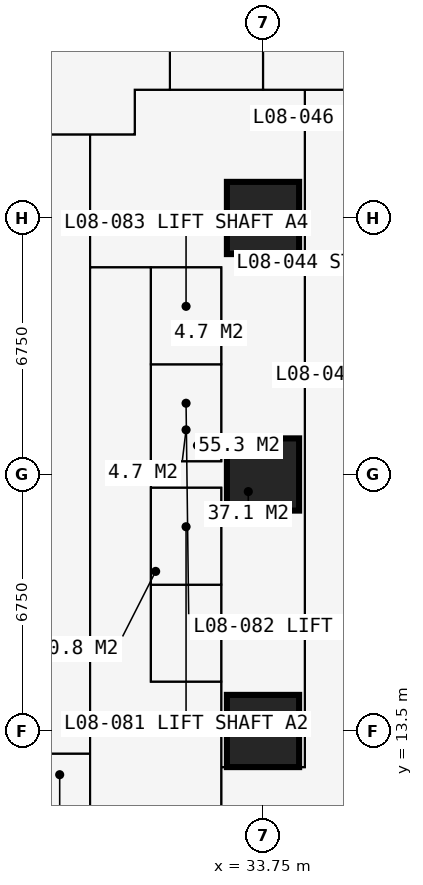
"""IFC4 building model, lengths in metres.
Left out: names, types, materials, properties, quantities, classifications, styles, units other than length and angle.
Written with IfcOpenShell. Run it as: python <this file> out.ifc"""

import sys

from ifc_helpers import new_model, si_unit, direction, frame, frame_2d, origin, origin_2d, place, context, subcontext, project, spatial, rectangle, extrude, element, fill, save


model = new_model("IFC4")
c1 = context("Model", 3, precision=1e-05, world=origin(), true_north=direction((0.0, 1.0)))
c2 = subcontext(c1, "Body", "Model", "MODEL_VIEW")
j1 = project(units=[si_unit("LENGTHUNIT", "METRE"), si_unit("PLANEANGLEUNIT", "RADIAN")], contexts=[c1])
p1 = place(None, origin())
s1 = spatial("IfcSite", under=j1, at=p1, CompositionType="ELEMENT")
p2 = place(p1, origin())
s2 = spatial("IfcBuilding", under=s1, at=p2, CompositionType="ELEMENT")
p3 = place(p2, frame((0.0, 0.0, 32.4)))
s3 = spatial("IfcBuildingStorey", under=s2, at=p3, CompositionType="ELEMENT", Elevation=32.4)
for number, where, z_axis, x_axis in (
    (1, (33.75, 13.5, 0.0), (0.0, 0.0, 1.0), (1.0, 0.0, 0.0)),
    (2, (33.75, 20.25, 0.0), (0.0, 0.0, 1.0), (1.0, 0.0, 0.0)),
    (3, (33.75, 27.0, 0.0), (0.0, 0.0, 1.0), (1.0, 0.0, 0.0)),
):
    element("IfcColumn", number, at=place(p3, frame(where, z_axis=z_axis, x_axis=x_axis)), inside=s3, PredefinedType="COLUMN", context=c2, shape_type="SweptSolid", body=[
        extrude(rectangle(XDim=1.9, YDim=1.9, at=origin_2d()), origin(), (0.0, 0.0, 1.0), 3.6),
    ])
p4 = place(p3, frame((11.3, 29.2, 0.0), z_axis=(0.0, 0.0, 1.0), x_axis=(1.0, 0.0, 0.0)))
e4 = element("IfcWall", 4, at=p4, inside=s3, PredefinedType="PARTITIONING", context=c2, shape_type="SweptSolid", body=[
    extrude(rectangle(XDim=19.075, YDim=0.15, at=frame_2d((9.538, 0.0))), origin(), (0.0, 0.0, 1.0), 3.375),
])
p5 = place(p4, frame((12.875, 0.0, 0.0)))
e5 = element("IfcOpeningElement", 5, at=p5, cuts=e4, PredefinedType="OPENING", context=c2, shape_type="SweptSolid", body=[
    extrude(rectangle(XDim=1.0, YDim=2.2, at=frame_2d((0.5, 1.1))), frame((0.0, 0.085, 0.0), z_axis=(0.0, -1.0, 0.0), x_axis=(1.0, 0.0, 0.0)), (0.0, 0.0, 1.0), 0.17),
])
p6 = place(p4, frame((10.438, 0.0, 0.0)))
e6 = element("IfcOpeningElement", 6, at=p6, cuts=e4, PredefinedType="OPENING", context=c2, shape_type="SweptSolid", body=[
    extrude(rectangle(XDim=1.0, YDim=2.2, at=frame_2d((0.5, 1.1))), frame((0.0, 0.085, 0.0), z_axis=(0.0, -1.0, 0.0), x_axis=(1.0, 0.0, 0.0)), (0.0, 0.0, 1.0), 0.17),
])
p7 = place(p4, frame((15.675, 0.0, 0.0)))
e7 = element("IfcOpeningElement", 7, at=p7, cuts=e4, PredefinedType="OPENING", context=c2, shape_type="SweptSolid", body=[
    extrude(rectangle(XDim=0.95, YDim=2.2, at=frame_2d((0.475, 1.1))), frame((0.0, 0.085, 0.0), z_axis=(0.0, -1.0, 0.0), x_axis=(1.0, 0.0, 0.0)), (0.0, 0.0, 1.0), 0.17),
])
p8 = place(p3, frame((27.6, 12.9, 0.0), z_axis=(0.0, 0.0, 1.0), x_axis=(1.0, 0.0, 0.0)))
e8 = element("IfcWall", 8, at=p8, inside=s3, PredefinedType="PARTITIONING", context=c2, shape_type="SweptSolid", body=[
    extrude(rectangle(XDim=1.6, YDim=0.15, at=frame_2d((0.8, 0.0))), origin(), (0.0, 0.0, 1.0), 2.877),
])
p9 = place(p3, frame((29.2, 11.3, 0.0), z_axis=(0.0, 0.0, 1.0), x_axis=(0.0, 1.0, 0.0)))
e9 = element("IfcWall", 9, at=p9, inside=s3, PredefinedType="PARTITIONING", context=c2, shape_type="SweptSolid", body=[
    extrude(rectangle(XDim=17.9, YDim=0.2, at=frame_2d((8.95, 0.0))), origin(), (0.0, 0.0, 1.0), 3.375),
])
p10 = place(p9, frame((8.35, 0.0, 0.0)))
e10 = element("IfcOpeningElement", 10, at=p10, cuts=e9, PredefinedType="OPENING", context=c2, shape_type="SweptSolid", body=[
    extrude(rectangle(XDim=1.2, YDim=2.2, at=frame_2d((0.6, 1.1))), frame((0.0, 0.11, 0.0), z_axis=(0.0, -1.0, 0.0), x_axis=(1.0, 0.0, 0.0)), (0.0, 0.0, 1.0), 0.22),
])
p11 = place(p3, frame((29.2, 25.7, 0.0), z_axis=(0.0, 0.0, 1.0), x_axis=(1.0, 0.0, 0.0)))
e11 = element("IfcWall", 11, at=p11, inside=s3, PredefinedType="SHEAR", context=c2, shape_type="SweptSolid", body=[
    extrude(rectangle(XDim=3.45, YDim=0.1, at=frame_2d((1.725, 0.0))), origin(), (0.0, 0.0, 1.0), 3.375),
])
p12 = place(p3, frame((30.375, 29.2, 0.0), z_axis=(0.0, 0.0, 1.0), x_axis=(0.0, 1.0, 0.0)))
e12 = element("IfcWall", 12, at=p12, inside=s3, PredefinedType="PARTITIONING", context=c2, shape_type="SweptSolid", body=[
    extrude(rectangle(XDim=1.175, YDim=0.15, at=frame_2d((0.587, 0.0))), origin(), (0.0, 0.0, 1.0), 3.375),
])
p13 = place(p3, frame((30.375, 30.375, 0.0), z_axis=(0.0, 0.0, 1.0), x_axis=(1.0, 0.0, 0.0)))
e13 = element("IfcWall", 13, at=p13, inside=s3, PredefinedType="PARTITIONING", context=c2, shape_type="SweptSolid", body=[
    extrude(rectangle(XDim=10.859, YDim=0.15, at=frame_2d((5.429, 0.0))), origin(), (0.0, 0.0, 1.0), 3.375),
])
p14 = place(p3, frame((30.8, 14.8, 0.0), z_axis=(0.0, 0.0, 1.0), x_axis=(0.0, 1.0, 0.0)))
e14 = element("IfcWall", 14, at=p14, inside=s3, PredefinedType="PARTITIONING", context=c2, shape_type="SweptSolid", body=[
    extrude(rectangle(XDim=10.9, YDim=0.15, at=frame_2d((5.45, 0.0))), origin(), (0.0, 0.0, 1.0), 3.375),
])
p15 = place(p14, frame((0.75, 0.0, 0.0)))
e15 = element("IfcOpeningElement", 15, at=p15, cuts=e14, PredefinedType="OPENING", context=c2, shape_type="SweptSolid", body=[
    extrude(rectangle(XDim=1.1, YDim=2.2, at=frame_2d((0.55, 1.1))), frame((0.0, 0.085, 0.0), z_axis=(0.0, -1.0, 0.0), x_axis=(1.0, 0.0, 0.0)), (0.0, 0.0, 1.0), 0.17),
])
p16 = place(p14, frame((3.25, 0.0, 0.0)))
e16 = element("IfcOpeningElement", 16, at=p16, cuts=e14, PredefinedType="OPENING", context=c2, shape_type="SweptSolid", body=[
    extrude(rectangle(XDim=1.1, YDim=2.2, at=frame_2d((0.55, 1.1))), frame((0.0, 0.085, 0.0), z_axis=(0.0, -1.0, 0.0), x_axis=(1.0, 0.0, 0.0)), (0.0, 0.0, 1.0), 0.17),
])
p17 = place(p14, frame((6.5, 0.0, 0.0)))
e17 = element("IfcOpeningElement", 17, at=p17, cuts=e14, PredefinedType="OPENING", context=c2, shape_type="SweptSolid", body=[
    extrude(rectangle(XDim=1.1, YDim=2.2, at=frame_2d((0.55, 1.1))), frame((0.0, 0.085, 0.0), z_axis=(0.0, -1.0, 0.0), x_axis=(1.0, 0.0, 0.0)), (0.0, 0.0, 1.0), 0.17),
])
p18 = place(p14, frame((9.05, 0.0, 0.0)))
e18 = element("IfcOpeningElement", 18, at=p18, cuts=e14, PredefinedType="OPENING", context=c2, shape_type="SweptSolid", body=[
    extrude(rectangle(XDim=1.1, YDim=2.2, at=frame_2d((0.55, 1.1))), frame((0.0, 0.085, 0.0), z_axis=(0.0, -1.0, 0.0), x_axis=(1.0, 0.0, 0.0)), (0.0, 0.0, 1.0), 0.17),
])
for number, where, z_axis, x_axis in (
    (19, (30.8, 14.8, 0.0), (0.0, 0.0, 1.0), (1.0, 0.0, 0.0)),
    (20, (30.8, 17.35, 0.0), (0.0, 0.0, 1.0), (1.0, 0.0, 0.0)),
    (21, (30.8, 19.9, 0.0), (0.0, 0.0, 1.0), (1.0, 0.0, 0.0)),
    (22, (30.8, 20.6, 0.0), (0.0, 0.0, 1.0), (1.0, 0.0, 0.0)),
    (23, (30.8, 23.15, 0.0), (0.0, 0.0, 1.0), (1.0, 0.0, 0.0)),
):
    element("IfcWall", number, at=place(p3, frame(where, z_axis=z_axis, x_axis=x_axis)), inside=s3, PredefinedType="SHEAR", context=c2, shape_type="SweptSolid", body=[
        extrude(rectangle(XDim=1.85, YDim=0.1, at=frame_2d((0.925, 0.0))), origin(), (0.0, 0.0, 1.0), 3.375),
    ])
p19 = place(p3, frame((31.3, 30.375, 0.0), z_axis=(0.0, 0.0, 1.0), x_axis=(0.0, 1.0, 0.0)))
e24 = element("IfcWall", 24, at=p19, inside=s3, PredefinedType="PARTITIONING", context=c2, shape_type="SweptSolid", body=[
    extrude(rectangle(XDim=4.475, YDim=0.15, at=frame_2d((2.238, 0.0))), origin(), (0.0, 0.0, 1.0), 3.375),
])
p20 = place(p3, frame((32.65, 10.6, 0.0), z_axis=(0.0, 0.0, 1.0), x_axis=(0.0, 1.0, 0.0)))
e25 = element("IfcWall", 25, at=p20, inside=s3, PredefinedType="SHEAR", context=c2, shape_type="SweptSolid", body=[
    extrude(rectangle(XDim=9.3, YDim=0.1, at=frame_2d((4.65, 0.0))), origin(), (0.0, 0.0, 1.0), 3.375),
])
p21 = place(p20, frame((0.5, 0.0, 0.0)))
e26 = element("IfcOpeningElement", 26, at=p21, cuts=e25, PredefinedType="OPENING", context=c2, shape_type="SweptSolid", body=[
    extrude(rectangle(XDim=1.0, YDim=2.2, at=frame_2d((0.5, 1.1))), frame((0.0, 0.06, 0.0), z_axis=(0.0, -1.0, 0.0), x_axis=(1.0, 0.0, 0.0)), (0.0, 0.0, 1.0), 0.12),
])
p22 = place(p3, frame((32.65, 12.55, 0.0), z_axis=(0.0, 0.0, 1.0), x_axis=(1.0, 0.0, 0.0)))
e27 = element("IfcWall", 27, at=p22, inside=s3, PredefinedType="PARTITIONING", context=c2, shape_type="SweptSolid", body=[
    extrude(rectangle(XDim=2.2, YDim=0.15, at=frame_2d((1.1, 0.0))), origin(), (0.0, 0.0, 1.0), 3.375),
])
p23 = place(p3, frame((32.65, 20.6, 0.0), z_axis=(0.0, 0.0, 1.0), x_axis=(0.0, 1.0, 0.0)))
e28 = element("IfcWall", 28, at=p23, inside=s3, PredefinedType="PARTITIONING", context=c2, shape_type="SweptSolid", body=[
    extrude(rectangle(XDim=5.1, YDim=0.15, at=frame_2d((2.55, 0.0))), origin(), (0.0, 0.0, 1.0), 3.375),
])
p24 = place(p3, frame((33.75, 30.375, 0.0), z_axis=(0.0, 0.0, 1.0), x_axis=(0.0, 1.0, 0.0)))
e29 = element("IfcWall", 29, at=p24, inside=s3, PredefinedType="PARTITIONING", context=c2, shape_type="SweptSolid", body=[
    extrude(rectangle(XDim=10.859, YDim=0.15, at=frame_2d((5.429, 0.0))), origin(), (0.0, 0.0, 1.0), 2.877),
])
p25 = place(p24, frame((1.4, 0.0, 0.0)))
e30 = element("IfcOpeningElement", 30, at=p25, cuts=e29, PredefinedType="OPENING", context=c2, shape_type="SweptSolid", body=[
    extrude(rectangle(XDim=1.0, YDim=2.2, at=frame_2d((0.5, 1.1))), frame((0.0, 0.085, 0.0), z_axis=(0.0, -1.0, 0.0), x_axis=(1.0, 0.0, 0.0)), (0.0, 0.0, 1.0), 0.17),
])
p26 = place(p3, frame((34.85, 12.55, 0.0), z_axis=(0.0, 0.0, 1.0), x_axis=(0.0, 1.0, 0.0)))
e31 = element("IfcWall", 31, at=p26, inside=s3, PredefinedType="PARTITIONING", context=c2, shape_type="SweptSolid", body=[
    extrude(rectangle(XDim=17.825, YDim=0.15, at=frame_2d((8.913, 0.0))), origin(), (0.0, 0.0, 1.0), 3.375),
])
p27 = place(p26, frame((8.65, 0.0, 0.0)))
e32 = element("IfcOpeningElement", 32, at=p27, cuts=e31, PredefinedType="OPENING", context=c2, shape_type="SweptSolid", body=[
    extrude(rectangle(XDim=0.95, YDim=2.2, at=frame_2d((0.475, 1.1))), frame((0.0, 0.085, 0.0), z_axis=(0.0, -1.0, 0.0), x_axis=(1.0, 0.0, 0.0)), (0.0, 0.0, 1.0), 0.17),
])
p28 = place(p21, origin())
e33 = element("IfcDoor", 33, at=p28, inside=s3, OperationType="SINGLE_SWING_LEFT", PredefinedType="DOOR", context=c2, shape_type="SweptSolid", body=[
    extrude(rectangle(XDim=1.0, YDim=2.2, at=frame_2d((0.5, 1.1))), frame((0.0, 0.025, 0.0), z_axis=(0.0, -1.0, 0.0), x_axis=(1.0, 0.0, 0.0)), (0.0, 0.0, 1.0), 0.05),
])
fill(e26, e33)
p29 = place(p27, origin())
e34 = element("IfcDoor", 34, at=p29, inside=s3, OperationType="SINGLE_SWING_LEFT", PredefinedType="DOOR", context=c2, shape_type="SweptSolid", body=[
    extrude(rectangle(XDim=0.95, YDim=2.2, at=frame_2d((0.475, 1.1))), frame((0.0, 0.025, 0.0), z_axis=(0.0, -1.0, 0.0), x_axis=(1.0, 0.0, 0.0)), (0.0, 0.0, 1.0), 0.05),
])
fill(e32, e34)
p30 = place(p15, origin())
e35 = element("IfcDoor", 35, at=p30, inside=s3, OperationType="DOUBLE_DOOR_SLIDING", PredefinedType="DOOR", context=c2, shape_type="SweptSolid", body=[
    extrude(rectangle(XDim=1.1, YDim=2.2, at=frame_2d((0.55, 1.1))), frame((0.0, 0.025, 0.0), z_axis=(0.0, -1.0, 0.0), x_axis=(1.0, 0.0, 0.0)), (0.0, 0.0, 1.0), 0.05),
])
fill(e15, e35)
p31 = place(p16, origin())
e36 = element("IfcDoor", 36, at=p31, inside=s3, OperationType="DOUBLE_DOOR_SLIDING", PredefinedType="DOOR", context=c2, shape_type="SweptSolid", body=[
    extrude(rectangle(XDim=1.1, YDim=2.2, at=frame_2d((0.55, 1.1))), frame((0.0, 0.025, 0.0), z_axis=(0.0, -1.0, 0.0), x_axis=(1.0, 0.0, 0.0)), (0.0, 0.0, 1.0), 0.05),
])
fill(e16, e36)
p32 = place(p17, origin())
e37 = element("IfcDoor", 37, at=p32, inside=s3, OperationType="DOUBLE_DOOR_SLIDING", PredefinedType="DOOR", context=c2, shape_type="SweptSolid", body=[
    extrude(rectangle(XDim=1.1, YDim=2.2, at=frame_2d((0.55, 1.1))), frame((0.0, 0.025, 0.0), z_axis=(0.0, -1.0, 0.0), x_axis=(1.0, 0.0, 0.0)), (0.0, 0.0, 1.0), 0.05),
])
fill(e17, e37)
p33 = place(p18, origin())
e38 = element("IfcDoor", 38, at=p33, inside=s3, OperationType="DOUBLE_DOOR_SLIDING", PredefinedType="DOOR", context=c2, shape_type="SweptSolid", body=[
    extrude(rectangle(XDim=1.1, YDim=2.2, at=frame_2d((0.55, 1.1))), frame((0.0, 0.025, 0.0), z_axis=(0.0, -1.0, 0.0), x_axis=(1.0, 0.0, 0.0)), (0.0, 0.0, 1.0), 0.05),
])
fill(e18, e38)
p34 = place(p10, origin())
e39 = element("IfcDoor", 39, at=p34, inside=s3, OperationType="DOUBLE_DOOR_SINGLE_SWING", PredefinedType="DOOR", context=c2, shape_type="SweptSolid", body=[
    extrude(rectangle(XDim=1.2, YDim=2.2, at=frame_2d((0.6, 1.1))), frame((0.0, 0.025, 0.0), z_axis=(0.0, -1.0, 0.0), x_axis=(1.0, 0.0, 0.0)), (0.0, 0.0, 1.0), 0.05),
])
fill(e10, e39)
save(model, sys.argv[1])
